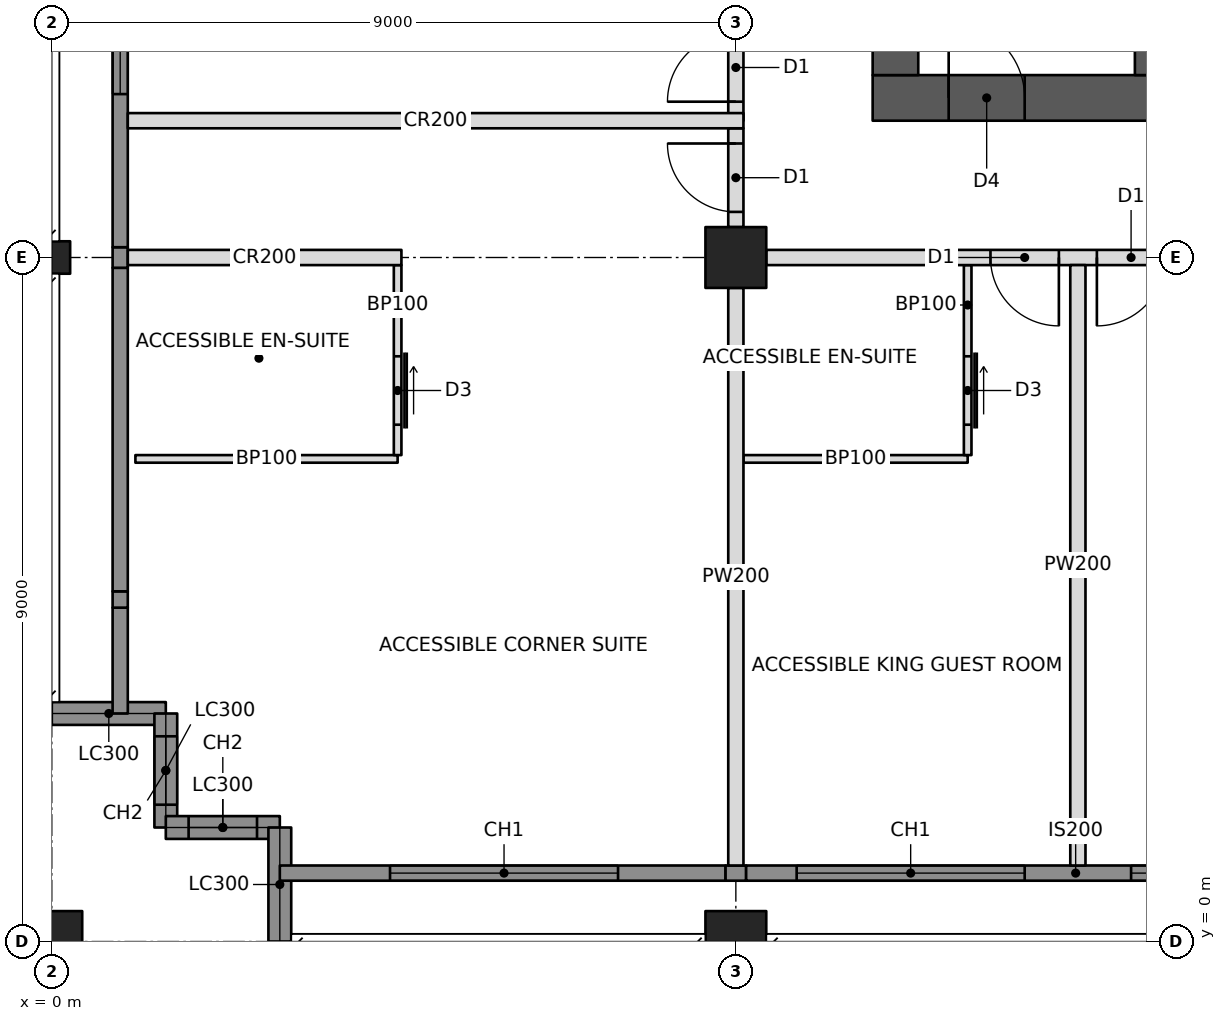
"""IFC4 building model, lengths in metres.
Left out: names, types, materials, properties, quantities, classifications, styles, units other than length and angle.
Written with IfcOpenShell. Run it as: python <this file> out.ifc"""

import sys

from ifc_helpers import new_model, si_unit, direction, frame, frame_2d, origin, origin_with_axes, origin_2d, place, context, subcontext, project, spatial, rectangle, hollow_rectangle, i_section, extrude, element, fill, save


model = new_model("IFC4")
c1 = context("Model", 3, precision=1e-05, world=origin(), true_north=direction((0.0, 1.0)))
c2 = subcontext(c1, "Body", "Model", "MODEL_VIEW")
j1 = project(units=[si_unit("LENGTHUNIT", "METRE"), si_unit("PLANEANGLEUNIT", "RADIAN")], contexts=[c1])
p1 = place(None, origin())
s1 = spatial("IfcSite", under=j1, at=p1, CompositionType="ELEMENT")
p2 = place(p1, origin())
s2 = spatial("IfcBuilding", under=s1, at=p2, CompositionType="ELEMENT")
p3 = place(p2, frame((0.0, 0.0, 201.2)))
s3 = spatial("IfcBuildingStorey", under=s2, at=p3, CompositionType="ELEMENT", Elevation=201.2)
p4 = place(p3, origin_with_axes())
e1 = element("IfcColumn", 1, at=p4, inside=s3, PredefinedType="COLUMN", context=c2, shape_type="SweptSolid", body=[
    extrude(hollow_rectangle(XDim=0.8, YDim=0.8, WallThickness=0.06, at=origin_2d()), origin(), (0.0, 0.0, 1.0), 3.4),
])
p5 = place(p3, frame((0.0, 9.0, 0.0), z_axis=(0.0, 0.0, 1.0), x_axis=(0.0, 1.0, 0.0)))
e2 = element("IfcColumn", 2, at=p5, inside=s3, PredefinedType="COLUMN", context=c2, shape_type="SweptSolid", body=[
    extrude(i_section(OverallWidth=0.427, OverallDepth=0.483, WebThickness=0.051, FlangeThickness=0.082, at=origin_2d()), origin(), (0.0, 0.0, 1.0), 3.4),
])
p6 = place(p3, frame((9.0, 0.0, 0.0), z_axis=(0.0, 0.0, 1.0), x_axis=(1.0, 0.0, 0.0)))
e3 = element("IfcColumn", 3, at=p6, inside=s3, PredefinedType="COLUMN", context=c2, shape_type="SweptSolid", body=[
    extrude(hollow_rectangle(XDim=0.8, YDim=0.8, WallThickness=0.06, at=origin_2d()), origin(), (0.0, 0.0, 1.0), 3.4),
])
p7 = place(p3, frame((9.0, 9.0, 0.0), z_axis=(0.0, 0.0, 1.0), x_axis=(1.0, 0.0, 0.0)))
e4 = element("IfcColumn", 4, at=p7, inside=s3, PredefinedType="COLUMN", context=c2, shape_type="SweptSolid", body=[
    extrude(hollow_rectangle(XDim=0.8, YDim=0.8, WallThickness=0.05, at=origin_2d()), origin(), (0.0, 0.0, 1.0), 3.4),
])
p8 = place(p3, frame((10.8, 11.1, 0.0), z_axis=(0.0, 0.0, 1.0), x_axis=(1.0, 0.0, 0.0)))
e5 = element("IfcWall", 5, at=p8, inside=s3, PredefinedType="SHEAR", context=c2, shape_type="SweptSolid", body=[
    extrude(rectangle(XDim=23.4, YDim=0.6, at=frame_2d((11.7, 0.0))), origin(), (0.0, 0.0, 1.0), 3.4),
])
p9 = place(p8, frame((1.0, 0.0, 0.0)))
e6 = element("IfcOpeningElement", 6, at=p9, cuts=e5, PredefinedType="OPENING", context=c2, shape_type="SweptSolid", body=[
    extrude(rectangle(XDim=1.0, YDim=2.1, at=frame_2d((0.5, 1.05))), frame((0.0, 0.31, 0.0), z_axis=(0.0, -1.0, 0.0), x_axis=(1.0, 0.0, 0.0)), (0.0, 0.0, 1.0), 0.62),
])
p10 = place(p8, frame((17.2, 0.0, 0.0)))
e7 = element("IfcOpeningElement", 7, at=p10, cuts=e5, PredefinedType="OPENING", context=c2, shape_type="SweptSolid", body=[
    extrude(rectangle(XDim=1.8, YDim=2.1, at=frame_2d((0.9, 1.05))), frame((0.0, 0.31, 0.0), z_axis=(0.0, -1.0, 0.0), x_axis=(1.0, 0.0, 0.0)), (0.0, 0.0, 1.0), 0.62),
])
p11 = place(p3, frame((11.1, 11.4, 0.0), z_axis=(0.0, 0.0, 1.0), x_axis=(0.0, 1.0, 0.0)))
e8 = element("IfcWall", 8, at=p11, inside=s3, PredefinedType="SHEAR", context=c2, shape_type="SweptSolid", body=[
    extrude(rectangle(XDim=13.2, YDim=0.6, at=frame_2d((6.6, 0.0))), origin(), (0.0, 0.0, 1.0), 3.4),
])
p12 = place(p3, frame((14.4, 11.4, 0.0), z_axis=(0.0, 0.0, 1.0), x_axis=(0.0, 1.0, 0.0)))
e9 = element("IfcWall", 9, at=p12, inside=s3, PredefinedType="SHEAR", context=c2, shape_type="SweptSolid", body=[
    extrude(rectangle(XDim=13.2, YDim=0.3, at=frame_2d((6.6, 0.0))), origin(), (0.0, 0.0, 1.0), 3.4),
])
p13 = place(p3, frame((0.0, 3.0, 0.0), z_axis=(0.0, 0.0, 1.0), x_axis=(1.0, 0.0, 0.0)))
e10 = element("IfcWall", 10, at=p13, inside=s3, PredefinedType="SOLIDWALL", context=c2, shape_type="SweptSolid", body=[
    extrude(rectangle(XDim=1.5, YDim=0.3, at=frame_2d((0.75, 0.0))), origin(), (0.0, 0.0, 1.0), 2.42),
])
p14 = place(p3, frame((1.5, 3.0, 0.0), z_axis=(0.0, 0.0, 1.0), x_axis=(0.0, -1.0, 0.0)))
e11 = element("IfcWall", 11, at=p14, inside=s3, PredefinedType="SOLIDWALL", context=c2, shape_type="SweptSolid", body=[
    extrude(rectangle(XDim=1.5, YDim=0.3, at=frame_2d((0.75, 0.0))), origin(), (0.0, 0.0, 1.0), 3.2),
])
p15 = place(p14, frame((0.3, 0.0, 0.6)))
e12 = element("IfcOpeningElement", 12, at=p15, cuts=e11, PredefinedType="OPENING", context=c2, shape_type="SweptSolid", body=[
    extrude(rectangle(XDim=0.9, YDim=2.2, at=frame_2d((0.45, 1.1))), frame((0.0, 0.16, 0.0), z_axis=(0.0, -1.0, 0.0), x_axis=(1.0, 0.0, 0.0)), (0.0, 0.0, 1.0), 0.32),
])
p16 = place(p3, frame((1.5, 1.5, 0.0), z_axis=(0.0, 0.0, 1.0), x_axis=(1.0, 0.0, 0.0)))
e13 = element("IfcWall", 13, at=p16, inside=s3, PredefinedType="SOLIDWALL", context=c2, shape_type="SweptSolid", body=[
    extrude(rectangle(XDim=1.5, YDim=0.3, at=frame_2d((0.75, 0.0))), origin(), (0.0, 0.0, 1.0), 3.2),
])
p17 = place(p16, frame((0.3, 0.0, 0.6)))
e14 = element("IfcOpeningElement", 14, at=p17, cuts=e13, PredefinedType="OPENING", context=c2, shape_type="SweptSolid", body=[
    extrude(rectangle(XDim=0.9, YDim=2.2, at=frame_2d((0.45, 1.1))), frame((0.0, 0.16, 0.0), z_axis=(0.0, -1.0, 0.0), x_axis=(1.0, 0.0, 0.0)), (0.0, 0.0, 1.0), 0.32),
])
p18 = place(p3, frame((3.0, 1.5, 0.0), z_axis=(0.0, 0.0, 1.0), x_axis=(0.0, -1.0, 0.0)))
e15 = element("IfcWall", 15, at=p18, inside=s3, PredefinedType="SOLIDWALL", context=c2, shape_type="SweptSolid", body=[
    extrude(rectangle(XDim=1.5, YDim=0.3, at=frame_2d((0.75, 0.0))), origin(), (0.0, 0.0, 1.0), 2.42),
])
p19 = place(p3, frame((3.0, 0.9, 0.0), z_axis=(0.0, 0.0, 1.0), x_axis=(1.0, 0.0, 0.0)))
e16 = element("IfcWall", 16, at=p19, inside=s3, PredefinedType="SOLIDWALL", context=c2, shape_type="SweptSolid", body=[
    extrude(rectangle(XDim=5.865, YDim=0.2, at=frame_2d((2.932, 0.0))), origin(), (0.0, 0.0, 1.0), 3.2),
])
p20 = place(p19, frame((1.45, 0.0, 0.6)))
e17 = element("IfcOpeningElement", 17, at=p20, cuts=e16, PredefinedType="OPENING", context=c2, shape_type="SweptSolid", body=[
    extrude(rectangle(XDim=3.0, YDim=2.2, at=frame_2d((1.5, 1.1))), frame((0.0, 0.11, 0.0), z_axis=(0.0, -1.0, 0.0), x_axis=(1.0, 0.0, 0.0)), (0.0, 0.0, 1.0), 0.22),
])
p21 = place(p3, frame((0.9, 3.0, 0.0), z_axis=(0.0, 0.0, 1.0), x_axis=(0.0, 1.0, 0.0)))
e18 = element("IfcWall", 18, at=p21, inside=s3, PredefinedType="SOLIDWALL", context=c2, shape_type="SweptSolid", body=[
    extrude(rectangle(XDim=1.393, YDim=0.2, at=frame_2d((0.696, 0.0))), origin(), (0.0, 0.0, 1.0), 3.2),
])
p22 = place(p3, frame((1.0, 9.0, 0.0), z_axis=(0.0, 0.0, 1.0), x_axis=(1.0, 0.0, 0.0)))
e19 = element("IfcWall", 19, at=p22, inside=s3, PredefinedType="PARTITIONING", context=c2, shape_type="SweptSolid", body=[
    extrude(rectangle(XDim=3.6, YDim=0.2, at=frame_2d((1.8, 0.0))), origin(), (0.0, 0.0, 1.0), 2.438),
])
p23 = place(p3, frame((9.4, 9.0, 0.0), z_axis=(0.0, 0.0, 1.0), x_axis=(1.0, 0.0, 0.0)))
e20 = element("IfcWall", 20, at=p23, inside=s3, PredefinedType="PARTITIONING", context=c2, shape_type="SweptSolid", body=[
    extrude(rectangle(XDim=8.2, YDim=0.2, at=frame_2d((4.1, 0.0))), origin(), (0.0, 0.0, 1.0), 2.405),
])
p24 = place(p23, frame((2.95, 0.0, 0.0)))
e21 = element("IfcOpeningElement", 21, at=p24, cuts=e20, PredefinedType="OPENING", context=c2, shape_type="SweptSolid", body=[
    extrude(rectangle(XDim=0.9, YDim=2.1, at=frame_2d((0.45, 1.05))), frame((0.0, 0.11, 0.0), z_axis=(0.0, -1.0, 0.0), x_axis=(1.0, 0.0, 0.0)), (0.0, 0.0, 1.0), 0.22),
])
p25 = place(p23, frame((4.35, 0.0, 0.0)))
e22 = element("IfcOpeningElement", 22, at=p25, cuts=e20, PredefinedType="OPENING", context=c2, shape_type="SweptSolid", body=[
    extrude(rectangle(XDim=0.9, YDim=2.1, at=frame_2d((0.45, 1.05))), frame((0.0, 0.11, 0.0), z_axis=(0.0, -1.0, 0.0), x_axis=(1.0, 0.0, 0.0)), (0.0, 0.0, 1.0), 0.22),
])
p26 = place(p3, frame((9.0, 10.8, 0.0), z_axis=(0.0, 0.0, 1.0), x_axis=(0.0, 1.0, 0.0)))
e23 = element("IfcWall", 23, at=p26, inside=s3, PredefinedType="PARTITIONING", context=c2, shape_type="SweptSolid", body=[
    extrude(rectangle(XDim=6.8, YDim=0.2, at=frame_2d((3.4, 0.0))), origin(), (0.0, 0.0, 1.0), 2.405),
])
p27 = place(p26, frame((0.25, 0.0, 0.0)))
e24 = element("IfcOpeningElement", 24, at=p27, cuts=e23, PredefinedType="OPENING", context=c2, shape_type="SweptSolid", body=[
    extrude(rectangle(XDim=0.9, YDim=2.1, at=frame_2d((0.45, 1.05))), frame((0.0, 0.11, 0.0), z_axis=(0.0, -1.0, 0.0), x_axis=(1.0, 0.0, 0.0)), (0.0, 0.0, 1.0), 0.22),
])
p28 = place(p3, frame((1.0, 10.8, 0.0), z_axis=(0.0, 0.0, 1.0), x_axis=(1.0, 0.0, 0.0)))
e25 = element("IfcWall", 25, at=p28, inside=s3, PredefinedType="PARTITIONING", context=c2, shape_type="SweptSolid", body=[
    extrude(rectangle(XDim=8.1, YDim=0.2, at=frame_2d((4.05, 0.0))), origin(), (0.0, 0.0, 1.0), 2.404),
])
p29 = place(p3, frame((9.0, 8.6, 0.0), z_axis=(0.0, 0.0, 1.0), x_axis=(0.0, -1.0, 0.0)))
e26 = element("IfcWall", 26, at=p29, inside=s3, PredefinedType="PARTITIONING", context=c2, shape_type="SweptSolid", body=[
    extrude(rectangle(XDim=7.6, YDim=0.2, at=frame_2d((3.8, 0.0))), origin(), (0.0, 0.0, 1.0), 2.438),
])
p30 = place(p3, frame((13.5, 8.9, 0.0), z_axis=(0.0, 0.0, 1.0), x_axis=(0.0, -1.0, 0.0)))
e27 = element("IfcWall", 27, at=p30, inside=s3, PredefinedType="PARTITIONING", context=c2, shape_type="SweptSolid", body=[
    extrude(rectangle(XDim=7.9, YDim=0.2, at=frame_2d((3.95, 0.0))), origin(), (0.0, 0.0, 1.0), 2.404),
])
p31 = place(p3, frame((1.1, 6.35, 0.0), z_axis=(0.0, 0.0, 1.0), x_axis=(1.0, 0.0, 0.0)))
e28 = element("IfcWall", 28, at=p31, inside=s3, PredefinedType="PARTITIONING", context=c2, shape_type="SweptSolid", body=[
    extrude(rectangle(XDim=3.45, YDim=0.1, at=frame_2d((1.725, 0.0))), origin(), (0.0, 0.0, 1.0), 3.2),
])
p32 = place(p3, frame((4.55, 8.9, 0.0), z_axis=(0.0, 0.0, 1.0), x_axis=(0.0, -1.0, 0.0)))
e29 = element("IfcWall", 29, at=p32, inside=s3, PredefinedType="PARTITIONING", context=c2, shape_type="SweptSolid", body=[
    extrude(rectangle(XDim=2.5, YDim=0.1, at=frame_2d((1.25, 0.0))), origin(), (0.0, 0.0, 1.0), 2.438),
])
p33 = place(p32, frame((1.2, 0.0, 0.0)))
e30 = element("IfcOpeningElement", 30, at=p33, cuts=e29, PredefinedType="OPENING", context=c2, shape_type="SweptSolid", body=[
    extrude(rectangle(XDim=0.9, YDim=2.1, at=frame_2d((0.45, 1.05))), frame((0.0, 0.06, 0.0), z_axis=(0.0, -1.0, 0.0), x_axis=(1.0, 0.0, 0.0)), (0.0, 0.0, 1.0), 0.12),
])
p34 = place(p3, frame((9.1, 6.35, 0.0), z_axis=(0.0, 0.0, 1.0), x_axis=(1.0, 0.0, 0.0)))
e31 = element("IfcWall", 31, at=p34, inside=s3, PredefinedType="PARTITIONING", context=c2, shape_type="SweptSolid", body=[
    extrude(rectangle(XDim=2.95, YDim=0.1, at=frame_2d((1.475, 0.0))), origin(), (0.0, 0.0, 1.0), 2.438),
])
p35 = place(p3, frame((12.05, 8.9, 0.0), z_axis=(0.0, 0.0, 1.0), x_axis=(0.0, -1.0, 0.0)))
e32 = element("IfcWall", 32, at=p35, inside=s3, PredefinedType="PARTITIONING", context=c2, shape_type="SweptSolid", body=[
    extrude(rectangle(XDim=2.5, YDim=0.1, at=frame_2d((1.25, 0.0))), origin(), (0.0, 0.0, 1.0), 2.404),
])
p36 = place(p35, frame((1.2, 0.0, 0.0)))
e33 = element("IfcOpeningElement", 33, at=p36, cuts=e32, PredefinedType="OPENING", context=c2, shape_type="SweptSolid", body=[
    extrude(rectangle(XDim=0.9, YDim=2.1, at=frame_2d((0.45, 1.05))), frame((0.0, 0.06, 0.0), z_axis=(0.0, -1.0, 0.0), x_axis=(1.0, 0.0, 0.0)), (0.0, 0.0, 1.0), 0.12),
])
p37 = place(p3, frame((9.0, 9.4, 0.0), z_axis=(0.0, 0.0, 1.0), x_axis=(0.0, 1.0, 0.0)))
e34 = element("IfcWall", 34, at=p37, inside=s3, PredefinedType="PARTITIONING", context=c2, shape_type="SweptSolid", body=[
    extrude(rectangle(XDim=1.3, YDim=0.2, at=frame_2d((0.65, 0.0))), origin(), (0.0, 0.0, 1.0), 2.405),
])
p38 = place(p37, frame((0.2, 0.0, 0.0)))
e35 = element("IfcOpeningElement", 35, at=p38, cuts=e34, PredefinedType="OPENING", context=c2, shape_type="SweptSolid", body=[
    extrude(rectangle(XDim=0.9, YDim=2.1, at=frame_2d((0.45, 1.05))), frame((0.0, 0.11, 0.0), z_axis=(0.0, -1.0, 0.0), x_axis=(1.0, 0.0, 0.0)), (0.0, 0.0, 1.0), 0.22),
])
p39 = place(p3, frame((8.865, 0.9, 0.0), z_axis=(0.0, 0.0, 1.0), x_axis=(1.0, 0.0, 0.0)))
e36 = element("IfcWall", 36, at=p39, inside=s3, PredefinedType="SOLIDWALL", context=c2, shape_type="SweptSolid", body=[
    extrude(rectangle(XDim=0.271, YDim=0.2, at=frame_2d((0.135, 0.0))), origin(), (0.0, 0.0, 1.0), 2.438),
])
p40 = place(p3, frame((9.135, 0.9, 0.0), z_axis=(0.0, 0.0, 1.0), x_axis=(1.0, 0.0, 0.0)))
e37 = element("IfcWall", 37, at=p40, inside=s3, PredefinedType="SOLIDWALL", context=c2, shape_type="SweptSolid", body=[
    extrude(rectangle(XDim=8.671, YDim=0.2, at=frame_2d((4.335, 0.0))), origin(), (0.0, 0.0, 1.0), 3.2),
])
p41 = place(p40, frame((0.665, 0.0, 0.6)))
e38 = element("IfcOpeningElement", 38, at=p41, cuts=e37, PredefinedType="OPENING", context=c2, shape_type="SweptSolid", body=[
    extrude(rectangle(XDim=3.0, YDim=2.2, at=frame_2d((1.5, 1.1))), frame((0.0, 0.11, 0.0), z_axis=(0.0, -1.0, 0.0), x_axis=(1.0, 0.0, 0.0)), (0.0, 0.0, 1.0), 0.22),
])
p42 = place(p40, frame((5.065, 0.0, 0.6)))
e39 = element("IfcOpeningElement", 39, at=p42, cuts=e37, PredefinedType="OPENING", context=c2, shape_type="SweptSolid", body=[
    extrude(rectangle(XDim=3.0, YDim=2.2, at=frame_2d((1.5, 1.1))), frame((0.0, 0.11, 0.0), z_axis=(0.0, -1.0, 0.0), x_axis=(1.0, 0.0, 0.0)), (0.0, 0.0, 1.0), 0.22),
])
p43 = place(p3, frame((0.9, 4.393, 0.0), z_axis=(0.0, 0.0, 1.0), x_axis=(0.0, 1.0, 0.0)))
e40 = element("IfcWall", 40, at=p43, inside=s3, PredefinedType="SOLIDWALL", context=c2, shape_type="SweptSolid", body=[
    extrude(rectangle(XDim=0.215, YDim=0.2, at=frame_2d((0.107, 0.0))), origin(), (0.0, 0.0, 1.0), 2.661),
])
p44 = place(p3, frame((0.9, 4.607, 0.0), z_axis=(0.0, 0.0, 1.0), x_axis=(0.0, 1.0, 0.0)))
e41 = element("IfcWall", 41, at=p44, inside=s3, PredefinedType="SOLIDWALL", context=c2, shape_type="SweptSolid", body=[
    extrude(rectangle(XDim=4.257, YDim=0.2, at=frame_2d((2.129, 0.0))), origin(), (0.0, 0.0, 1.0), 3.2),
])
p45 = place(p3, frame((0.9, 8.865, 0.0), z_axis=(0.0, 0.0, 1.0), x_axis=(0.0, 1.0, 0.0)))
e42 = element("IfcWall", 42, at=p45, inside=s3, PredefinedType="SOLIDWALL", context=c2, shape_type="SweptSolid", body=[
    extrude(rectangle(XDim=0.271, YDim=0.2, at=frame_2d((0.135, 0.0))), origin(), (0.0, 0.0, 1.0), 2.438),
])
p46 = place(p3, frame((0.9, 9.135, 0.0), z_axis=(0.0, 0.0, 1.0), x_axis=(0.0, 1.0, 0.0)))
e43 = element("IfcWall", 43, at=p46, inside=s3, PredefinedType="SOLIDWALL", context=c2, shape_type="SweptSolid", body=[
    extrude(rectangle(XDim=8.671, YDim=0.2, at=frame_2d((4.335, 0.0))), origin(), (0.0, 0.0, 1.0), 3.2),
])
p47 = place(p46, frame((2.015, 0.0, 0.6)))
e44 = element("IfcOpeningElement", 44, at=p47, cuts=e43, PredefinedType="OPENING", context=c2, shape_type="SweptSolid", body=[
    extrude(rectangle(XDim=3.0, YDim=2.2, at=frame_2d((1.5, 1.1))), frame((0.0, 0.11, 0.0), z_axis=(0.0, -1.0, 0.0), x_axis=(1.0, 0.0, 0.0)), (0.0, 0.0, 1.0), 0.22),
])
p48 = place(p46, frame((5.515, 0.0, 0.6)))
e45 = element("IfcOpeningElement", 45, at=p48, cuts=e43, PredefinedType="OPENING", context=c2, shape_type="SweptSolid", body=[
    extrude(rectangle(XDim=3.0, YDim=2.2, at=frame_2d((1.5, 1.1))), frame((0.0, 0.11, 0.0), z_axis=(0.0, -1.0, 0.0), x_axis=(1.0, 0.0, 0.0)), (0.0, 0.0, 1.0), 0.22),
])
p49 = place(p15, origin())
e46 = element("IfcWindow", 46, at=p49, inside=s3, PartitioningType="SINGLE_PANEL", PredefinedType="WINDOW", context=c2, shape_type="SweptSolid", body=[
    extrude(rectangle(XDim=0.9, YDim=2.2, at=frame_2d((0.45, 1.1))), frame((0.0, 0.03, 0.0), z_axis=(0.0, -1.0, 0.0), x_axis=(1.0, 0.0, 0.0)), (0.0, 0.0, 1.0), 0.06),
])
fill(e12, e46)
p50 = place(p17, origin())
e47 = element("IfcWindow", 47, at=p50, inside=s3, PartitioningType="SINGLE_PANEL", PredefinedType="WINDOW", context=c2, shape_type="SweptSolid", body=[
    extrude(rectangle(XDim=0.9, YDim=2.2, at=frame_2d((0.45, 1.1))), frame((0.0, 0.03, 0.0), z_axis=(0.0, -1.0, 0.0), x_axis=(1.0, 0.0, 0.0)), (0.0, 0.0, 1.0), 0.06),
])
fill(e14, e47)
p51 = place(p20, origin())
e48 = element("IfcWindow", 48, at=p51, inside=s3, PartitioningType="TRIPLE_PANEL_VERTICAL", PredefinedType="WINDOW", context=c2, shape_type="SweptSolid", body=[
    extrude(rectangle(XDim=3.0, YDim=2.2, at=frame_2d((1.5, 1.1))), frame((0.0, 0.03, 0.0), z_axis=(0.0, -1.0, 0.0), x_axis=(1.0, 0.0, 0.0)), (0.0, 0.0, 1.0), 0.06),
])
fill(e17, e48)
p52 = place(p41, origin())
e49 = element("IfcWindow", 49, at=p52, inside=s3, PartitioningType="TRIPLE_PANEL_VERTICAL", PredefinedType="WINDOW", context=c2, shape_type="SweptSolid", body=[
    extrude(rectangle(XDim=3.0, YDim=2.2, at=frame_2d((1.5, 1.1))), frame((0.0, 0.03, 0.0), z_axis=(0.0, -1.0, 0.0), x_axis=(1.0, 0.0, 0.0)), (0.0, 0.0, 1.0), 0.06),
])
fill(e38, e49)
p53 = place(p42, origin())
e50 = element("IfcWindow", 50, at=p53, inside=s3, PartitioningType="TRIPLE_PANEL_VERTICAL", PredefinedType="WINDOW", context=c2, shape_type="SweptSolid", body=[
    extrude(rectangle(XDim=3.0, YDim=2.2, at=frame_2d((1.5, 1.1))), frame((0.0, 0.03, 0.0), z_axis=(0.0, -1.0, 0.0), x_axis=(1.0, 0.0, 0.0)), (0.0, 0.0, 1.0), 0.06),
])
fill(e39, e50)
p54 = place(p47, origin())
e51 = element("IfcWindow", 51, at=p54, inside=s3, PartitioningType="TRIPLE_PANEL_VERTICAL", PredefinedType="WINDOW", context=c2, shape_type="SweptSolid", body=[
    extrude(rectangle(XDim=3.0, YDim=2.2, at=frame_2d((1.5, 1.1))), frame((0.0, 0.03, 0.0), z_axis=(0.0, -1.0, 0.0), x_axis=(1.0, 0.0, 0.0)), (0.0, 0.0, 1.0), 0.06),
])
fill(e44, e51)
p55 = place(p33, origin())
e52 = element("IfcDoor", 52, at=p55, inside=s3, OperationType="SLIDING_TO_LEFT", PredefinedType="DOOR", context=c2, shape_type="SweptSolid", body=[
    extrude(rectangle(XDim=0.9, YDim=2.1, at=frame_2d((0.45, 1.05))), frame((0.0, 0.025, 0.0), z_axis=(0.0, -1.0, 0.0), x_axis=(1.0, 0.0, 0.0)), (0.0, 0.0, 1.0), 0.05),
])
fill(e30, e52)
p56 = place(p36, origin())
e53 = element("IfcDoor", 53, at=p56, inside=s3, OperationType="SLIDING_TO_LEFT", PredefinedType="DOOR", context=c2, shape_type="SweptSolid", body=[
    extrude(rectangle(XDim=0.9, YDim=2.1, at=frame_2d((0.45, 1.05))), frame((0.0, 0.025, 0.0), z_axis=(0.0, -1.0, 0.0), x_axis=(1.0, 0.0, 0.0)), (0.0, 0.0, 1.0), 0.05),
])
fill(e33, e53)
p57 = place(p24, frame((0.9, 0.0, 0.0), z_axis=(0.0, 0.0, 1.0), x_axis=(-1.0, 0.0, 0.0)))
e54 = element("IfcDoor", 54, at=p57, inside=s3, OperationType="SINGLE_SWING_LEFT", PredefinedType="DOOR", context=c2, shape_type="SweptSolid", body=[
    extrude(rectangle(XDim=0.9, YDim=2.1, at=frame_2d((0.45, 1.05))), frame((0.0, 0.025, 0.0), z_axis=(0.0, -1.0, 0.0), x_axis=(1.0, 0.0, 0.0)), (0.0, 0.0, 1.0), 0.05),
])
fill(e21, e54)
p58 = place(p25, frame((0.9, 0.0, 0.0), z_axis=(0.0, 0.0, 1.0), x_axis=(-1.0, 0.0, 0.0)))
e55 = element("IfcDoor", 55, at=p58, inside=s3, OperationType="SINGLE_SWING_RIGHT", PredefinedType="DOOR", context=c2, shape_type="SweptSolid", body=[
    extrude(rectangle(XDim=0.9, YDim=2.1, at=frame_2d((0.45, 1.05))), frame((0.0, 0.025, 0.0), z_axis=(0.0, -1.0, 0.0), x_axis=(1.0, 0.0, 0.0)), (0.0, 0.0, 1.0), 0.05),
])
fill(e22, e55)
p59 = place(p27, origin())
e56 = element("IfcDoor", 56, at=p59, inside=s3, OperationType="SINGLE_SWING_LEFT", PredefinedType="DOOR", context=c2, shape_type="SweptSolid", body=[
    extrude(rectangle(XDim=0.9, YDim=2.1, at=frame_2d((0.45, 1.05))), frame((0.0, 0.025, 0.0), z_axis=(0.0, -1.0, 0.0), x_axis=(1.0, 0.0, 0.0)), (0.0, 0.0, 1.0), 0.05),
])
fill(e24, e56)
p60 = place(p38, origin())
e57 = element("IfcDoor", 57, at=p60, inside=s3, OperationType="SINGLE_SWING_RIGHT", PredefinedType="DOOR", context=c2, shape_type="SweptSolid", body=[
    extrude(rectangle(XDim=0.9, YDim=2.1, at=frame_2d((0.45, 1.05))), frame((0.0, 0.025, 0.0), z_axis=(0.0, -1.0, 0.0), x_axis=(1.0, 0.0, 0.0)), (0.0, 0.0, 1.0), 0.05),
])
fill(e35, e57)
p61 = place(p9, origin())
e58 = element("IfcDoor", 58, at=p61, inside=s3, OperationType="SINGLE_SWING_LEFT", PredefinedType="DOOR", context=c2, shape_type="SweptSolid", body=[
    extrude(rectangle(XDim=1.0, YDim=2.1, at=frame_2d((0.5, 1.05))), frame((0.0, 0.025, 0.0), z_axis=(0.0, -1.0, 0.0), x_axis=(1.0, 0.0, 0.0)), (0.0, 0.0, 1.0), 0.05),
])
fill(e6, e58)
save(model, sys.argv[1])
